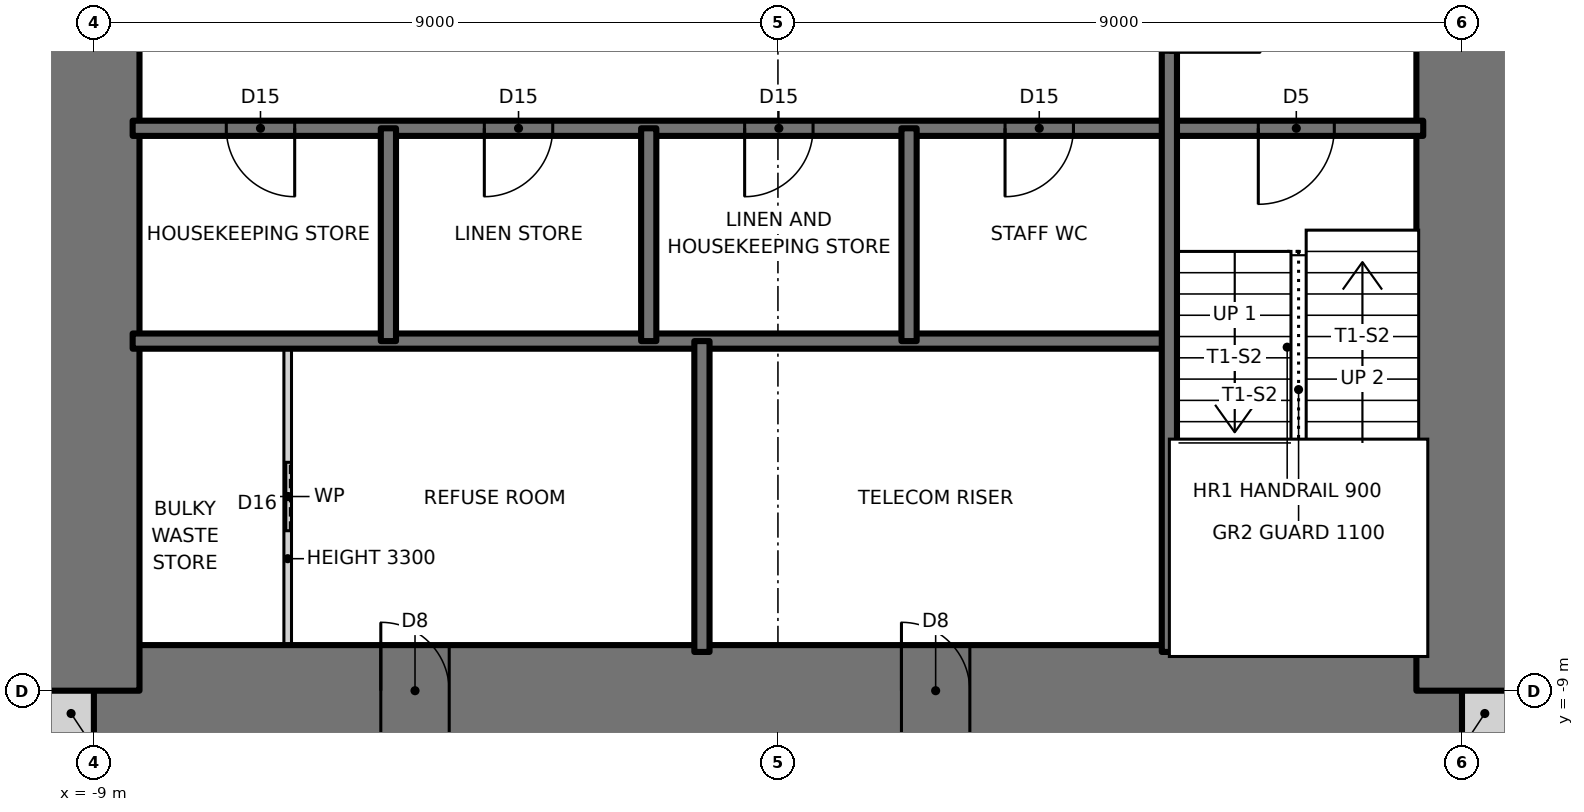
"""IFC4 building model, lengths in metres.
Left out: names, types, materials, properties, quantities, classifications, styles, units other than length and angle.
Written with IfcOpenShell. Run it as: python <this file> out.ifc"""

import sys

from ifc_helpers import new_model, si_unit, direction, frame, frame_2d, origin, place, context, subcontext, project, spatial, rectangle, extrude, element, fill, save


model = new_model("IFC4")
c1 = context("Model", 3, precision=1e-05, world=origin(), true_north=direction((0.0, 1.0)))
c2 = subcontext(c1, "Body", "Model", "MODEL_VIEW")
j1 = project(units=[si_unit("LENGTHUNIT", "METRE"), si_unit("PLANEANGLEUNIT", "RADIAN")], contexts=[c1])
p1 = place(None, origin())
s1 = spatial("IfcSite", under=j1, at=p1, CompositionType="ELEMENT")
p2 = place(p1, origin())
s2 = spatial("IfcBuilding", under=s1, at=p2, CompositionType="ELEMENT")
p3 = place(p2, frame((0.0, 0.0, 246.5)))
s3 = spatial("IfcBuildingStorey", under=s2, at=p3, CompositionType="ELEMENT", Elevation=246.5)
for number, where, z_axis, x_axis in (
    (1, (-9.6, -9.3, 0.0), (0.0, 0.0, 1.0), (1.0, 0.0, 0.0)),
    (2, (9.0, -9.3, 0.0), (0.0, 0.0, 1.0), (1.0, 0.0, 0.0)),
):
    element("IfcWall", number, at=place(p3, frame(where, z_axis=z_axis, x_axis=x_axis)), inside=s3, PredefinedType="SOLIDWALL", context=c2, shape_type="SweptSolid", body=[
        extrude(rectangle(XDim=0.6, YDim=0.6, at=frame_2d((0.3, 0.0))), origin(), (0.0, 0.0, 1.0), 3.5),
    ])
p4 = place(p3, frame((-9.0, -9.0, 0.0), z_axis=(0.0, 0.0, 1.0), x_axis=(1.0, 0.0, 0.0)))
e3 = element("IfcWall", 3, at=p4, inside=s3, PredefinedType="SHEAR", context=c2, shape_type="SweptSolid", body=[
    extrude(rectangle(XDim=18.0, YDim=1.2, at=frame_2d((9.0, 0.0))), origin(), (0.0, 0.0, 1.0), 3.5),
])
p5 = place(p4, frame((3.775, 0.0, 0.0)))
e4 = element("IfcOpeningElement", 4, at=p5, cuts=e3, PredefinedType="OPENING", context=c2, shape_type="SweptSolid", body=[
    extrude(rectangle(XDim=0.9, YDim=2.1, at=frame_2d((0.45, 1.05))), frame((0.0, 0.61, 0.0), z_axis=(0.0, -1.0, 0.0), x_axis=(1.0, 0.0, 0.0)), (0.0, 0.0, 1.0), 1.22),
])
p6 = place(p4, frame((10.625, 0.0, 0.0)))
e5 = element("IfcOpeningElement", 5, at=p6, cuts=e3, PredefinedType="OPENING", context=c2, shape_type="SweptSolid", body=[
    extrude(rectangle(XDim=0.9, YDim=2.1, at=frame_2d((0.45, 1.05))), frame((0.0, 0.61, 0.0), z_axis=(0.0, -1.0, 0.0), x_axis=(1.0, 0.0, 0.0)), (0.0, 0.0, 1.0), 1.22),
])
p7 = place(p3, frame((9.0, -9.0, 0.0), z_axis=(0.0, 0.0, 1.0), x_axis=(0.0, 1.0, 0.0)))
e6 = element("IfcWall", 6, at=p7, inside=s3, PredefinedType="SHEAR", context=c2, shape_type="SweptSolid", body=[
    extrude(rectangle(XDim=18.0, YDim=1.2, at=frame_2d((9.0, 0.0))), origin(), (0.0, 0.0, 1.0), 3.5),
])
p8 = place(p7, frame((8.5, 0.0, 0.0)))
e7 = element("IfcOpeningElement", 7, at=p8, cuts=e6, PredefinedType="OPENING", context=c2, shape_type="SweptSolid", body=[
    extrude(rectangle(XDim=1.0, YDim=2.1, at=frame_2d((0.5, 1.05))), frame((0.0, 0.61, 0.0), z_axis=(0.0, -1.0, 0.0), x_axis=(1.0, 0.0, 0.0)), (0.0, 0.0, 1.0), 1.22),
])
p9 = place(p3, frame((-9.0, 9.0, 0.0), z_axis=(0.0, 0.0, 1.0), x_axis=(0.0, -1.0, 0.0)))
e8 = element("IfcWall", 8, at=p9, inside=s3, PredefinedType="SHEAR", context=c2, shape_type="SweptSolid", body=[
    extrude(rectangle(XDim=18.0, YDim=1.2, at=frame_2d((9.0, 0.0))), origin(), (0.0, 0.0, 1.0), 3.5),
])
p10 = place(p9, frame((8.5, 0.0, 0.0)))
e9 = element("IfcOpeningElement", 9, at=p10, cuts=e8, PredefinedType="OPENING", context=c2, shape_type="SweptSolid", body=[
    extrude(rectangle(XDim=1.0, YDim=2.1, at=frame_2d((0.5, 1.05))), frame((0.0, 0.61, 0.0), z_axis=(0.0, -1.0, 0.0), x_axis=(1.0, 0.0, 0.0)), (0.0, 0.0, 1.0), 1.22),
])
p11 = place(p3, frame((-8.49, -4.4, 0.0), z_axis=(0.0, 0.0, 1.0), x_axis=(1.0, 0.0, 0.0)))
e10 = element("IfcWall", 10, at=p11, inside=s3, PredefinedType="SOLIDWALL", context=c2, shape_type="SweptSolid", body=[
    extrude(rectangle(XDim=13.64, YDim=0.2, at=frame_2d((6.82, 0.0))), origin(), (0.0, 0.0, 1.0), 3.5),
])
p12 = place(p3, frame((-8.49, -1.6, 0.0), z_axis=(0.0, 0.0, 1.0), x_axis=(1.0, 0.0, 0.0)))
e11 = element("IfcWall", 11, at=p12, inside=s3, PredefinedType="SOLIDWALL", context=c2, shape_type="SweptSolid", body=[
    extrude(rectangle(XDim=16.98, YDim=0.2, at=frame_2d((8.49, 0.0))), origin(), (0.0, 0.0, 1.0), 3.5),
])
p13 = place(p12, frame((14.81, 0.0, 0.0)))
e12 = element("IfcOpeningElement", 12, at=p13, cuts=e11, PredefinedType="OPENING", context=c2, shape_type="SweptSolid", body=[
    extrude(rectangle(XDim=1.0, YDim=2.1, at=frame_2d((0.5, 1.05))), frame((0.0, 0.11, 0.0), z_axis=(0.0, -1.0, 0.0), x_axis=(1.0, 0.0, 0.0)), (0.0, 0.0, 1.0), 0.22),
])
p14 = place(p12, frame((1.232, 0.0, 0.0)))
e13 = element("IfcOpeningElement", 13, at=p14, cuts=e11, PredefinedType="OPENING", context=c2, shape_type="SweptSolid", body=[
    extrude(rectangle(XDim=0.9, YDim=2.1, at=frame_2d((0.45, 1.05))), frame((0.0, 0.11, 0.0), z_axis=(0.0, -1.0, 0.0), x_axis=(1.0, 0.0, 0.0)), (0.0, 0.0, 1.0), 0.22),
])
p15 = place(p12, frame((4.627, 0.0, 0.0)))
e14 = element("IfcOpeningElement", 14, at=p15, cuts=e11, PredefinedType="OPENING", context=c2, shape_type="SweptSolid", body=[
    extrude(rectangle(XDim=0.9, YDim=2.1, at=frame_2d((0.45, 1.05))), frame((0.0, 0.11, 0.0), z_axis=(0.0, -1.0, 0.0), x_axis=(1.0, 0.0, 0.0)), (0.0, 0.0, 1.0), 0.22),
])
p16 = place(p12, frame((8.052, 0.0, 0.0)))
e15 = element("IfcOpeningElement", 15, at=p16, cuts=e11, PredefinedType="OPENING", context=c2, shape_type="SweptSolid", body=[
    extrude(rectangle(XDim=0.9, YDim=2.1, at=frame_2d((0.45, 1.05))), frame((0.0, 0.11, 0.0), z_axis=(0.0, -1.0, 0.0), x_axis=(1.0, 0.0, 0.0)), (0.0, 0.0, 1.0), 0.22),
])
p17 = place(p12, frame((11.478, 0.0, 0.0)))
e16 = element("IfcOpeningElement", 16, at=p17, cuts=e11, PredefinedType="OPENING", context=c2, shape_type="SweptSolid", body=[
    extrude(rectangle(XDim=0.9, YDim=2.1, at=frame_2d((0.45, 1.05))), frame((0.0, 0.11, 0.0), z_axis=(0.0, -1.0, 0.0), x_axis=(1.0, 0.0, 0.0)), (0.0, 0.0, 1.0), 0.22),
])
p18 = place(p3, frame((5.15, -8.49, 0.0), z_axis=(0.0, 0.0, 1.0), x_axis=(0.0, 1.0, 0.0)))
e17 = element("IfcWall", 17, at=p18, inside=s3, PredefinedType="SOLIDWALL", context=c2, shape_type="SweptSolid", body=[
    extrude(rectangle(XDim=13.09, YDim=0.2, at=frame_2d((6.545, 0.0))), origin(), (0.0, 0.0, 1.0), 3.5),
])
p19 = place(p18, frame((7.89, 0.0, 0.0)))
e18 = element("IfcOpeningElement", 18, at=p19, cuts=e17, PredefinedType="OPENING", context=c2, shape_type="SweptSolid", body=[
    extrude(rectangle(XDim=1.2, YDim=2.1, at=frame_2d((0.6, 1.05))), frame((0.0, 0.11, 0.0), z_axis=(0.0, -1.0, 0.0), x_axis=(1.0, 0.0, 0.0)), (0.0, 0.0, 1.0), 0.22),
])
p20 = place(p3, frame((1.725, -4.4, 0.0), z_axis=(0.0, 0.0, 1.0), x_axis=(0.0, 1.0, 0.0)))
e19 = element("IfcWall", 19, at=p20, inside=s3, PredefinedType="SOLIDWALL", context=c2, shape_type="SweptSolid", body=[
    extrude(rectangle(XDim=2.8, YDim=0.2, at=frame_2d((1.4, 0.0))), origin(), (0.0, 0.0, 1.0), 3.5),
])
p21 = place(p3, frame((-1.0, -8.49, 0.0), z_axis=(0.0, 0.0, 1.0), x_axis=(0.0, 1.0, 0.0)))
e20 = element("IfcWall", 20, at=p21, inside=s3, PredefinedType="SOLIDWALL", context=c2, shape_type="SweptSolid", body=[
    extrude(rectangle(XDim=4.09, YDim=0.2, at=frame_2d((2.045, 0.0))), origin(), (0.0, 0.0, 1.0), 3.5),
])
for number, where, z_axis, x_axis in (
    (21, (-1.7, -4.4, 0.0), (0.0, 0.0, 1.0), (0.0, 1.0, 0.0)),
    (22, (-5.125, -4.4, 0.0), (0.0, 0.0, 1.0), (0.0, 1.0, 0.0)),
):
    element("IfcWall", number, at=place(p3, frame(where, z_axis=z_axis, x_axis=x_axis)), inside=s3, PredefinedType="SOLIDWALL", context=c2, shape_type="SweptSolid", body=[
        extrude(rectangle(XDim=2.8, YDim=0.2, at=frame_2d((1.4, 0.0))), origin(), (0.0, 0.0, 1.0), 3.5),
    ])
p22 = place(p3, frame((-6.45, -8.49, 0.0), z_axis=(0.0, 0.0, 1.0), x_axis=(0.0, 1.0, 0.0)))
e23 = element("IfcWall", 23, at=p22, inside=s3, PredefinedType="PARTITIONING", context=c2, shape_type="SweptSolid", body=[
    extrude(rectangle(XDim=4.09, YDim=0.1, at=frame_2d((2.045, 0.0))), origin(), (0.0, 0.0, 1.0), 3.3),
])
p23 = place(p22, frame((1.595, 0.0, 0.0)))
e24 = element("IfcOpeningElement", 24, at=p23, cuts=e23, PredefinedType="OPENING", context=c2, shape_type="SweptSolid", body=[
    extrude(rectangle(XDim=0.9, YDim=2.1, at=frame_2d((0.45, 1.05))), frame((0.0, 0.06, 0.0), z_axis=(0.0, -1.0, 0.0), x_axis=(1.0, 0.0, 0.0)), (0.0, 0.0, 1.0), 0.12),
])
p24 = place(p13, frame((1.0, 0.0, 0.0), z_axis=(0.0, 0.0, 1.0), x_axis=(-1.0, 0.0, 0.0)))
e25 = element("IfcDoor", 25, at=p24, inside=s3, OperationType="SINGLE_SWING_RIGHT", PredefinedType="DOOR", context=c2, shape_type="SweptSolid", body=[
    extrude(rectangle(XDim=1.0, YDim=2.1, at=frame_2d((0.5, 1.05))), frame((0.0, 0.025, 0.0), z_axis=(0.0, -1.0, 0.0), x_axis=(1.0, 0.0, 0.0)), (0.0, 0.0, 1.0), 0.05),
])
fill(e12, e25)
p25 = place(p19, frame((1.2, 0.0, 0.0), z_axis=(0.0, 0.0, 1.0), x_axis=(-1.0, 0.0, 0.0)))
e26 = element("IfcDoor", 26, at=p25, inside=s3, OperationType="SINGLE_SWING_RIGHT", PredefinedType="DOOR", context=c2, shape_type="SweptSolid", body=[
    extrude(rectangle(XDim=1.2, YDim=2.1, at=frame_2d((0.6, 1.05))), frame((0.0, 0.025, 0.0), z_axis=(0.0, -1.0, 0.0), x_axis=(1.0, 0.0, 0.0)), (0.0, 0.0, 1.0), 0.05),
])
fill(e18, e26)
p26 = place(p14, frame((0.9, 0.0, 0.0), z_axis=(0.0, 0.0, 1.0), x_axis=(-1.0, 0.0, 0.0)))
e27 = element("IfcDoor", 27, at=p26, inside=s3, OperationType="SINGLE_SWING_LEFT", PredefinedType="DOOR", context=c2, shape_type="SweptSolid", body=[
    extrude(rectangle(XDim=0.9, YDim=2.1, at=frame_2d((0.45, 1.05))), frame((0.0, 0.025, 0.0), z_axis=(0.0, -1.0, 0.0), x_axis=(1.0, 0.0, 0.0)), (0.0, 0.0, 1.0), 0.05),
])
fill(e13, e27)
p27 = place(p15, frame((0.9, 0.0, 0.0), z_axis=(0.0, 0.0, 1.0), x_axis=(-1.0, 0.0, 0.0)))
e28 = element("IfcDoor", 28, at=p27, inside=s3, OperationType="SINGLE_SWING_RIGHT", PredefinedType="DOOR", context=c2, shape_type="SweptSolid", body=[
    extrude(rectangle(XDim=0.9, YDim=2.1, at=frame_2d((0.45, 1.05))), frame((0.0, 0.025, 0.0), z_axis=(0.0, -1.0, 0.0), x_axis=(1.0, 0.0, 0.0)), (0.0, 0.0, 1.0), 0.05),
])
fill(e14, e28)
p28 = place(p16, frame((0.9, 0.0, 0.0), z_axis=(0.0, 0.0, 1.0), x_axis=(-1.0, 0.0, 0.0)))
e29 = element("IfcDoor", 29, at=p28, inside=s3, OperationType="SINGLE_SWING_RIGHT", PredefinedType="DOOR", context=c2, shape_type="SweptSolid", body=[
    extrude(rectangle(XDim=0.9, YDim=2.1, at=frame_2d((0.45, 1.05))), frame((0.0, 0.025, 0.0), z_axis=(0.0, -1.0, 0.0), x_axis=(1.0, 0.0, 0.0)), (0.0, 0.0, 1.0), 0.05),
])
fill(e15, e29)
p29 = place(p17, frame((0.9, 0.0, 0.0), z_axis=(0.0, 0.0, 1.0), x_axis=(-1.0, 0.0, 0.0)))
e30 = element("IfcDoor", 30, at=p29, inside=s3, OperationType="SINGLE_SWING_RIGHT", PredefinedType="DOOR", context=c2, shape_type="SweptSolid", body=[
    extrude(rectangle(XDim=0.9, YDim=2.1, at=frame_2d((0.45, 1.05))), frame((0.0, 0.025, 0.0), z_axis=(0.0, -1.0, 0.0), x_axis=(1.0, 0.0, 0.0)), (0.0, 0.0, 1.0), 0.05),
])
fill(e16, e30)
p30 = place(p23, origin())
e31 = element("IfcDoor", 31, at=p30, inside=s3, OperationType="SLIDING_TO_LEFT", PredefinedType="DOOR", context=c2, shape_type="SweptSolid", body=[
    extrude(rectangle(XDim=0.9, YDim=2.1, at=frame_2d((0.45, 1.05))), frame((0.0, 0.025, 0.0), z_axis=(0.0, -1.0, 0.0), x_axis=(1.0, 0.0, 0.0)), (0.0, 0.0, 1.0), 0.05),
])
fill(e24, e31)
p31 = place(p5, origin())
e32 = element("IfcDoor", 32, at=p31, inside=s3, OperationType="SINGLE_SWING_LEFT", PredefinedType="DOOR", context=c2, shape_type="SweptSolid", body=[
    extrude(rectangle(XDim=0.9, YDim=2.1, at=frame_2d((0.45, 1.05))), frame((0.0, 0.025, 0.0), z_axis=(0.0, -1.0, 0.0), x_axis=(1.0, 0.0, 0.0)), (0.0, 0.0, 1.0), 0.05),
])
fill(e4, e32)
p32 = place(p6, origin())
e33 = element("IfcDoor", 33, at=p32, inside=s3, OperationType="SINGLE_SWING_LEFT", PredefinedType="DOOR", context=c2, shape_type="SweptSolid", body=[
    extrude(rectangle(XDim=0.9, YDim=2.1, at=frame_2d((0.45, 1.05))), frame((0.0, 0.025, 0.0), z_axis=(0.0, -1.0, 0.0), x_axis=(1.0, 0.0, 0.0)), (0.0, 0.0, 1.0), 0.05),
])
fill(e5, e33)
save(model, sys.argv[1])
